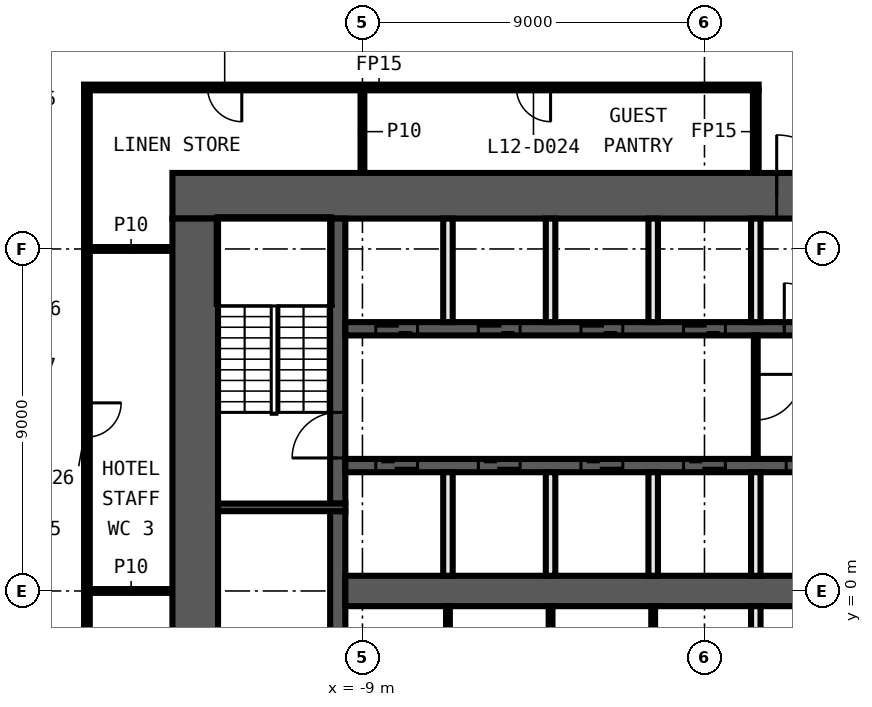
"""IFC4 building model, lengths in metres.
Left out: names, types, materials, properties, quantities, classifications, styles, units other than length and angle.
Written with IfcOpenShell. Run it as: python <this file> out.ifc"""

import sys

from ifc_helpers import new_model, si_unit, direction, frame, frame_2d, origin, place, context, subcontext, project, spatial, rectangle, extrude, element, fill, save


model = new_model("IFC4")
c1 = context("Model", 3, precision=1e-05, world=origin(), true_north=direction((0.0, 1.0)))
c2 = subcontext(c1, "Body", "Model", "MODEL_VIEW")
j1 = project(units=[si_unit("LENGTHUNIT", "METRE"), si_unit("PLANEANGLEUNIT", "RADIAN")], contexts=[c1])
p1 = place(None, origin())
s1 = spatial("IfcSite", under=j1, at=p1, CompositionType="ELEMENT")
p2 = place(p1, origin())
s2 = spatial("IfcBuilding", under=s1, at=p2, CompositionType="ELEMENT")
p3 = place(p2, frame((0.0, 0.0, 66.2)))
s3 = spatial("IfcBuildingStorey", under=s2, at=p3, CompositionType="ELEMENT", Elevation=66.2)
for number, where, z_axis, x_axis in (
    (1, (-16.175, 0.0, 0.0), (0.0, 0.0, 1.0), (1.0, 0.0, 0.0)),
    (2, (-16.175, 9.0, 0.0), (0.0, 0.0, 1.0), (1.0, 0.0, 0.0)),
):
    element("IfcWall", number, at=place(p3, frame(where, z_axis=z_axis, x_axis=x_axis)), inside=s3, PredefinedType="PARTITIONING", context=c2, shape_type="SweptSolid", body=[
        extrude(rectangle(XDim=2.175, YDim=0.1, at=frame_2d((1.087, 0.0))), origin(), (0.0, 0.0, 1.0), 3.3),
    ])
p4 = place(p3, frame((1.425, 13.25, 0.0), z_axis=(0.0, 0.0, 1.0), x_axis=(-1.0, 0.0, 0.0)))
e3 = element("IfcWall", 3, at=p4, inside=s3, PredefinedType="PARTITIONING", context=c2, shape_type="SweptSolid", body=[
    extrude(rectangle(XDim=17.75, YDim=0.15, at=frame_2d((8.875, 0.0))), origin(), (0.0, 0.0, 1.0), 3.3),
])
p5 = place(p4, frame((5.475, 0.0, 0.0)))
e4 = element("IfcOpeningElement", 4, at=p5, cuts=e3, PredefinedType="OPENING", context=c2, shape_type="SweptSolid", body=[
    extrude(rectangle(XDim=0.9, YDim=2.1, at=frame_2d((0.45, 1.05))), frame((0.0, 0.085, 0.0), z_axis=(0.0, -1.0, 0.0), x_axis=(1.0, 0.0, 0.0)), (0.0, 0.0, 1.0), 0.17),
])
p6 = place(p4, frame((13.6, 0.0, 0.0)))
e5 = element("IfcOpeningElement", 5, at=p6, cuts=e3, PredefinedType="OPENING", context=c2, shape_type="SweptSolid", body=[
    extrude(rectangle(XDim=0.9, YDim=2.1, at=frame_2d((0.45, 1.05))), frame((0.0, 0.085, 0.0), z_axis=(0.0, -1.0, 0.0), x_axis=(1.0, 0.0, 0.0)), (0.0, 0.0, 1.0), 0.17),
])
p7 = place(p3, frame((1.35, 11.0, 0.0), z_axis=(0.0, 0.0, 1.0), x_axis=(0.0, 1.0, 0.0)))
e6 = element("IfcWall", 6, at=p7, inside=s3, PredefinedType="PARTITIONING", context=c2, shape_type="SweptSolid", body=[
    extrude(rectangle(XDim=2.175, YDim=0.15, at=frame_2d((1.087, 0.0))), origin(), (0.0, 0.0, 1.0), 3.3),
])
p8 = place(p3, frame((-9.0, 11.0, 0.0), z_axis=(0.0, 0.0, 1.0), x_axis=(0.0, 1.0, 0.0)))
e7 = element("IfcWall", 7, at=p8, inside=s3, PredefinedType="PARTITIONING", context=c2, shape_type="SweptSolid", body=[
    extrude(rectangle(XDim=2.175, YDim=0.1, at=frame_2d((1.087, 0.0))), origin(), (0.0, 0.0, 1.0), 3.3),
])
p9 = place(p3, frame((-16.25, 13.175, 0.0), z_axis=(0.0, 0.0, 1.0), x_axis=(0.0, -1.0, 0.0)))
e8 = element("IfcWall", 8, at=p9, inside=s3, PredefinedType="PARTITIONING", context=c2, shape_type="SweptSolid", body=[
    extrude(rectangle(XDim=26.35, YDim=0.15, at=frame_2d((13.175, 0.0))), origin(), (0.0, 0.0, 1.0), 3.3),
])
p10 = place(p9, frame((17.225, 0.0, 0.0)))
e9 = element("IfcOpeningElement", 9, at=p10, cuts=e8, PredefinedType="OPENING", context=c2, shape_type="SweptSolid", body=[
    extrude(rectangle(XDim=0.9, YDim=2.1, at=frame_2d((0.45, 1.05))), frame((0.0, 0.085, 0.0), z_axis=(0.0, -1.0, 0.0), x_axis=(1.0, 0.0, 0.0)), (0.0, 0.0, 1.0), 0.17),
])
p11 = place(p9, frame((8.225, 0.0, 0.0)))
e10 = element("IfcOpeningElement", 10, at=p11, cuts=e8, PredefinedType="OPENING", context=c2, shape_type="SweptSolid", body=[
    extrude(rectangle(XDim=0.9, YDim=2.1, at=frame_2d((0.45, 1.05))), frame((0.0, 0.085, 0.0), z_axis=(0.0, -1.0, 0.0), x_axis=(1.0, 0.0, 0.0)), (0.0, 0.0, 1.0), 0.17),
])
p12 = place(p3, frame((-14.0, 10.4, 0.0), z_axis=(0.0, 0.0, 1.0), x_axis=(1.0, 0.0, 0.0)))
e11 = element("IfcWall", 11, at=p12, inside=s3, PredefinedType="SHEAR", context=c2, shape_type="SweptSolid", body=[
    extrude(rectangle(XDim=28.0, YDim=1.2, at=frame_2d((14.0, 0.0))), origin(), (0.0, 0.0, 1.0), 3.3),
])
p13 = place(p12, frame((15.9, 0.0, 0.0)))
e12 = element("IfcOpeningElement", 12, at=p13, cuts=e11, PredefinedType="OPENING", context=c2, shape_type="SweptSolid", body=[
    extrude(rectangle(XDim=1.6, YDim=2.1, at=frame_2d((0.8, 1.05))), frame((0.0, 0.61, 0.0), z_axis=(0.0, -1.0, 0.0), x_axis=(1.0, 0.0, 0.0)), (0.0, 0.0, 1.0), 1.22),
])
p14 = place(p3, frame((-13.4, -9.8, 0.0), z_axis=(0.0, 0.0, 1.0), x_axis=(0.0, 1.0, 0.0)))
e13 = element("IfcWall", 13, at=p14, inside=s3, PredefinedType="SHEAR", context=c2, shape_type="SweptSolid", body=[
    extrude(rectangle(XDim=19.6, YDim=1.2, at=frame_2d((9.8, 0.0))), origin(), (0.0, 0.0, 1.0), 3.3),
])
p15 = place(p3, frame((-9.65, -2.1, 0.0), z_axis=(0.0, 0.0, 1.0), x_axis=(0.0, 1.0, 0.0)))
e14 = element("IfcWall", 14, at=p15, inside=s3, PredefinedType="SHEAR", context=c2, shape_type="SweptSolid", body=[
    extrude(rectangle(XDim=4.2, YDim=0.4, at=frame_2d((2.1, 0.0))), origin(), (0.0, 0.0, 1.0), 3.3),
])
p16 = place(p3, frame((-9.65, 2.3, 0.0), z_axis=(0.0, 0.0, 1.0), x_axis=(0.0, 1.0, 0.0)))
e15 = element("IfcWall", 15, at=p16, inside=s3, PredefinedType="SHEAR", context=c2, shape_type="SweptSolid", body=[
    extrude(rectangle(XDim=7.5, YDim=0.4, at=frame_2d((3.75, 0.0))), origin(), (0.0, 0.0, 1.0), 3.3),
])
p17 = place(p16, frame((1.2, 0.0, 0.0)))
e16 = element("IfcOpeningElement", 16, at=p17, cuts=e15, PredefinedType="OPENING", context=c2, shape_type="SweptSolid", body=[
    extrude(rectangle(XDim=1.2, YDim=2.1, at=frame_2d((0.6, 1.05))), frame((0.0, 0.21, 0.0), z_axis=(0.0, -1.0, 0.0), x_axis=(1.0, 0.0, 0.0)), (0.0, 0.0, 1.0), 0.42),
])
p18 = place(p3, frame((-9.45, 2.2, 0.0), z_axis=(0.0, 0.0, 1.0), x_axis=(-1.0, 0.0, 0.0)))
e17 = element("IfcWall", 17, at=p18, inside=s3, PredefinedType="SHEAR", context=c2, shape_type="SweptSolid", body=[
    extrude(rectangle(XDim=3.35, YDim=0.2, at=frame_2d((1.675, 0.0))), origin(), (0.0, 0.0, 1.0), 3.3),
])
p19 = place(p3, frame((-9.45, 6.9, 0.0), z_axis=(0.0, 0.0, 1.0), x_axis=(1.0, 0.0, 0.0)))
e18 = element("IfcWall", 18, at=p19, inside=s3, PredefinedType="SHEAR", context=c2, shape_type="SweptSolid", body=[
    extrude(rectangle(XDim=18.9, YDim=0.35, at=frame_2d((9.45, 0.0))), origin(), (0.0, 0.0, 1.0), 3.3),
])
p20 = place(p19, frame((0.8, 0.0, 0.0)))
e19 = element("IfcOpeningElement", 19, at=p20, cuts=e18, PredefinedType="OPENING", context=c2, shape_type="SweptSolid", body=[
    extrude(rectangle(XDim=1.1, YDim=2.1, at=frame_2d((0.55, 1.05))), frame((0.0, 0.185, 0.0), z_axis=(0.0, -1.0, 0.0), x_axis=(1.0, 0.0, 0.0)), (0.0, 0.0, 1.0), 0.37),
])
p21 = place(p19, frame((3.5, 0.0, 0.0)))
e20 = element("IfcOpeningElement", 20, at=p21, cuts=e18, PredefinedType="OPENING", context=c2, shape_type="SweptSolid", body=[
    extrude(rectangle(XDim=1.1, YDim=2.1, at=frame_2d((0.55, 1.05))), frame((0.0, 0.185, 0.0), z_axis=(0.0, -1.0, 0.0), x_axis=(1.0, 0.0, 0.0)), (0.0, 0.0, 1.0), 0.37),
])
p22 = place(p19, frame((6.2, 0.0, 0.0)))
e21 = element("IfcOpeningElement", 21, at=p22, cuts=e18, PredefinedType="OPENING", context=c2, shape_type="SweptSolid", body=[
    extrude(rectangle(XDim=1.1, YDim=2.1, at=frame_2d((0.55, 1.05))), frame((0.0, 0.185, 0.0), z_axis=(0.0, -1.0, 0.0), x_axis=(1.0, 0.0, 0.0)), (0.0, 0.0, 1.0), 0.37),
])
p23 = place(p19, frame((8.9, 0.0, 0.0)))
e22 = element("IfcOpeningElement", 22, at=p23, cuts=e18, PredefinedType="OPENING", context=c2, shape_type="SweptSolid", body=[
    extrude(rectangle(XDim=1.1, YDim=2.1, at=frame_2d((0.55, 1.05))), frame((0.0, 0.185, 0.0), z_axis=(0.0, -1.0, 0.0), x_axis=(1.0, 0.0, 0.0)), (0.0, 0.0, 1.0), 0.37),
])
p24 = place(p19, frame((11.55, 0.0, 0.0)))
e23 = element("IfcOpeningElement", 23, at=p24, cuts=e18, PredefinedType="OPENING", context=c2, shape_type="SweptSolid", body=[
    extrude(rectangle(XDim=1.2, YDim=2.1, at=frame_2d((0.6, 1.05))), frame((0.0, 0.185, 0.0), z_axis=(0.0, -1.0, 0.0), x_axis=(1.0, 0.0, 0.0)), (0.0, 0.0, 1.0), 0.37),
])
p25 = place(p19, frame((14.3, 0.0, 0.0)))
e24 = element("IfcOpeningElement", 24, at=p25, cuts=e18, PredefinedType="OPENING", context=c2, shape_type="SweptSolid", body=[
    extrude(rectangle(XDim=1.1, YDim=2.1, at=frame_2d((0.55, 1.05))), frame((0.0, 0.185, 0.0), z_axis=(0.0, -1.0, 0.0), x_axis=(1.0, 0.0, 0.0)), (0.0, 0.0, 1.0), 0.37),
])
p26 = place(p19, frame((17.0, 0.0, 0.0)))
e25 = element("IfcOpeningElement", 25, at=p26, cuts=e18, PredefinedType="OPENING", context=c2, shape_type="SweptSolid", body=[
    extrude(rectangle(XDim=1.1, YDim=2.1, at=frame_2d((0.55, 1.05))), frame((0.0, 0.185, 0.0), z_axis=(0.0, -1.0, 0.0), x_axis=(1.0, 0.0, 0.0)), (0.0, 0.0, 1.0), 0.37),
])
p27 = place(p3, frame((9.45, 3.3, 0.0), z_axis=(0.0, 0.0, 1.0), x_axis=(-1.0, 0.0, 0.0)))
e26 = element("IfcWall", 26, at=p27, inside=s3, PredefinedType="SHEAR", context=c2, shape_type="SweptSolid", body=[
    extrude(rectangle(XDim=18.9, YDim=0.35, at=frame_2d((9.45, 0.0))), origin(), (0.0, 0.0, 1.0), 3.3),
])
p28 = place(p27, frame((17.0, 0.0, 0.0)))
e27 = element("IfcOpeningElement", 27, at=p28, cuts=e26, PredefinedType="OPENING", context=c2, shape_type="SweptSolid", body=[
    extrude(rectangle(XDim=1.1, YDim=2.1, at=frame_2d((0.55, 1.05))), frame((0.0, 0.185, 0.0), z_axis=(0.0, -1.0, 0.0), x_axis=(1.0, 0.0, 0.0)), (0.0, 0.0, 1.0), 0.37),
])
p29 = place(p27, frame((14.3, 0.0, 0.0)))
e28 = element("IfcOpeningElement", 28, at=p29, cuts=e26, PredefinedType="OPENING", context=c2, shape_type="SweptSolid", body=[
    extrude(rectangle(XDim=1.1, YDim=2.1, at=frame_2d((0.55, 1.05))), frame((0.0, 0.185, 0.0), z_axis=(0.0, -1.0, 0.0), x_axis=(1.0, 0.0, 0.0)), (0.0, 0.0, 1.0), 0.37),
])
p30 = place(p27, frame((11.6, 0.0, 0.0)))
e29 = element("IfcOpeningElement", 29, at=p30, cuts=e26, PredefinedType="OPENING", context=c2, shape_type="SweptSolid", body=[
    extrude(rectangle(XDim=1.1, YDim=2.1, at=frame_2d((0.55, 1.05))), frame((0.0, 0.185, 0.0), z_axis=(0.0, -1.0, 0.0), x_axis=(1.0, 0.0, 0.0)), (0.0, 0.0, 1.0), 0.37),
])
p31 = place(p27, frame((8.9, 0.0, 0.0)))
e30 = element("IfcOpeningElement", 30, at=p31, cuts=e26, PredefinedType="OPENING", context=c2, shape_type="SweptSolid", body=[
    extrude(rectangle(XDim=1.1, YDim=2.1, at=frame_2d((0.55, 1.05))), frame((0.0, 0.185, 0.0), z_axis=(0.0, -1.0, 0.0), x_axis=(1.0, 0.0, 0.0)), (0.0, 0.0, 1.0), 0.37),
])
p32 = place(p27, frame((6.2, 0.0, 0.0)))
e31 = element("IfcOpeningElement", 31, at=p32, cuts=e26, PredefinedType="OPENING", context=c2, shape_type="SweptSolid", body=[
    extrude(rectangle(XDim=1.1, YDim=2.1, at=frame_2d((0.55, 1.05))), frame((0.0, 0.185, 0.0), z_axis=(0.0, -1.0, 0.0), x_axis=(1.0, 0.0, 0.0)), (0.0, 0.0, 1.0), 0.37),
])
p33 = place(p27, frame((3.5, 0.0, 0.0)))
e32 = element("IfcOpeningElement", 32, at=p33, cuts=e26, PredefinedType="OPENING", context=c2, shape_type="SweptSolid", body=[
    extrude(rectangle(XDim=1.1, YDim=2.1, at=frame_2d((0.55, 1.05))), frame((0.0, 0.185, 0.0), z_axis=(0.0, -1.0, 0.0), x_axis=(1.0, 0.0, 0.0)), (0.0, 0.0, 1.0), 0.37),
])
p34 = place(p27, frame((0.9, 0.0, 0.0)))
e33 = element("IfcOpeningElement", 33, at=p34, cuts=e26, PredefinedType="OPENING", context=c2, shape_type="SweptSolid", body=[
    extrude(rectangle(XDim=0.9, YDim=2.1, at=frame_2d((0.45, 1.05))), frame((0.0, 0.185, 0.0), z_axis=(0.0, -1.0, 0.0), x_axis=(1.0, 0.0, 0.0)), (0.0, 0.0, 1.0), 0.37),
])
p35 = place(p3, frame((-9.45, 0.0, 0.0), z_axis=(0.0, 0.0, 1.0), x_axis=(1.0, 0.0, 0.0)))
e34 = element("IfcWall", 34, at=p35, inside=s3, PredefinedType="SHEAR", context=c2, shape_type="SweptSolid", body=[
    extrude(rectangle(XDim=18.9, YDim=0.8, at=frame_2d((9.45, 0.0))), origin(), (0.0, 0.0, 1.0), 3.3),
])
p36 = place(p3, frame((1.35, 6.725, 0.0), z_axis=(0.0, 0.0, 1.0), x_axis=(0.0, -1.0, 0.0)))
e35 = element("IfcWall", 35, at=p36, inside=s3, PredefinedType="PARTITIONING", context=c2, shape_type="SweptSolid", body=[
    extrude(rectangle(XDim=3.25, YDim=0.1, at=frame_2d((1.625, 0.0))), origin(), (0.0, 0.0, 1.0), 3.3),
])
p37 = place(p36, frame((1.025, 0.0, 0.0)))
e36 = element("IfcOpeningElement", 36, at=p37, cuts=e35, PredefinedType="OPENING", context=c2, shape_type="SweptSolid", body=[
    extrude(rectangle(XDim=1.2, YDim=2.1, at=frame_2d((0.6, 1.05))), frame((0.0, 0.06, 0.0), z_axis=(0.0, -1.0, 0.0), x_axis=(1.0, 0.0, 0.0)), (0.0, 0.0, 1.0), 0.12),
])
for number, where, z_axis, x_axis in (
    (37, (1.35, -3.125, 0.0), (0.0, 0.0, 1.0), (0.0, 1.0, 0.0)),
    (38, (1.35, 0.4, 0.0), (0.0, 0.0, 1.0), (0.0, 1.0, 0.0)),
    (39, (1.35, 7.075, 0.0), (0.0, 0.0, 1.0), (0.0, 1.0, 0.0)),
):
    element("IfcWall", number, at=place(p3, frame(where, z_axis=z_axis, x_axis=x_axis)), inside=s3, PredefinedType="SOLIDWALL", context=c2, shape_type="SweptSolid", body=[
        extrude(rectangle(XDim=2.725, YDim=0.25, at=frame_2d((1.363, 0.0))), origin(), (0.0, 0.0, 1.0), 3.3),
    ])
p38 = place(p3, frame((-1.35, -3.125, 0.0), z_axis=(0.0, 0.0, 1.0), x_axis=(0.0, 1.0, 0.0)))
e40 = element("IfcWall", 40, at=p38, inside=s3, PredefinedType="PARTITIONING", context=c2, shape_type="SweptSolid", body=[
    extrude(rectangle(XDim=2.725, YDim=0.1, at=frame_2d((1.363, 0.0))), origin(), (0.0, 0.0, 1.0), 3.3),
])
for number, where, z_axis, x_axis in (
    (41, (-1.35, 0.4, 0.0), (0.0, 0.0, 1.0), (0.0, 1.0, 0.0)),
    (42, (-1.35, 7.075, 0.0), (0.0, 0.0, 1.0), (0.0, 1.0, 0.0)),
):
    element("IfcWall", number, at=place(p3, frame(where, z_axis=z_axis, x_axis=x_axis)), inside=s3, PredefinedType="SOLIDWALL", context=c2, shape_type="SweptSolid", body=[
        extrude(rectangle(XDim=2.725, YDim=0.25, at=frame_2d((1.363, 0.0))), origin(), (0.0, 0.0, 1.0), 3.3),
    ])
p39 = place(p3, frame((-4.05, -3.125, 0.0), z_axis=(0.0, 0.0, 1.0), x_axis=(0.0, 1.0, 0.0)))
e43 = element("IfcWall", 43, at=p39, inside=s3, PredefinedType="PARTITIONING", context=c2, shape_type="SweptSolid", body=[
    extrude(rectangle(XDim=2.725, YDim=0.1, at=frame_2d((1.363, 0.0))), origin(), (0.0, 0.0, 1.0), 3.3),
])
for number, where, z_axis, x_axis in (
    (44, (-4.05, 0.4, 0.0), (0.0, 0.0, 1.0), (0.0, 1.0, 0.0)),
    (45, (-4.05, 7.075, 0.0), (0.0, 0.0, 1.0), (0.0, 1.0, 0.0)),
):
    element("IfcWall", number, at=place(p3, frame(where, z_axis=z_axis, x_axis=x_axis)), inside=s3, PredefinedType="SOLIDWALL", context=c2, shape_type="SweptSolid", body=[
        extrude(rectangle(XDim=2.725, YDim=0.25, at=frame_2d((1.363, 0.0))), origin(), (0.0, 0.0, 1.0), 3.3),
    ])
p40 = place(p3, frame((-6.75, -3.125, 0.0), z_axis=(0.0, 0.0, 1.0), x_axis=(0.0, 1.0, 0.0)))
e46 = element("IfcWall", 46, at=p40, inside=s3, PredefinedType="PARTITIONING", context=c2, shape_type="SweptSolid", body=[
    extrude(rectangle(XDim=2.725, YDim=0.1, at=frame_2d((1.363, 0.0))), origin(), (0.0, 0.0, 1.0), 3.3),
])
for number, where, z_axis, x_axis in (
    (47, (-6.75, 0.4, 0.0), (0.0, 0.0, 1.0), (0.0, 1.0, 0.0)),
    (48, (-6.75, 7.075, 0.0), (0.0, 0.0, 1.0), (0.0, 1.0, 0.0)),
):
    element("IfcWall", number, at=place(p3, frame(where, z_axis=z_axis, x_axis=x_axis)), inside=s3, PredefinedType="SOLIDWALL", context=c2, shape_type="SweptSolid", body=[
        extrude(rectangle(XDim=2.725, YDim=0.25, at=frame_2d((1.363, 0.0))), origin(), (0.0, 0.0, 1.0), 3.3),
    ])
p41 = place(p5, origin())
e49 = element("IfcDoor", 49, at=p41, inside=s3, OperationType="SINGLE_SWING_RIGHT", PredefinedType="DOOR", context=c2, shape_type="SweptSolid", body=[
    extrude(rectangle(XDim=0.9, YDim=2.1, at=frame_2d((0.45, 1.05))), frame((0.0, 0.025, 0.0), z_axis=(0.0, -1.0, 0.0), x_axis=(1.0, 0.0, 0.0)), (0.0, 0.0, 1.0), 0.05),
])
fill(e4, e49)
p42 = place(p6, origin())
e50 = element("IfcDoor", 50, at=p42, inside=s3, OperationType="SINGLE_SWING_LEFT", PredefinedType="DOOR", context=c2, shape_type="SweptSolid", body=[
    extrude(rectangle(XDim=0.9, YDim=2.1, at=frame_2d((0.45, 1.05))), frame((0.0, 0.025, 0.0), z_axis=(0.0, -1.0, 0.0), x_axis=(1.0, 0.0, 0.0)), (0.0, 0.0, 1.0), 0.05),
])
fill(e5, e50)
p43 = place(p11, origin())
e51 = element("IfcDoor", 51, at=p43, inside=s3, OperationType="SINGLE_SWING_RIGHT", PredefinedType="DOOR", context=c2, shape_type="SweptSolid", body=[
    extrude(rectangle(XDim=0.9, YDim=2.1, at=frame_2d((0.45, 1.05))), frame((0.0, 0.025, 0.0), z_axis=(0.0, -1.0, 0.0), x_axis=(1.0, 0.0, 0.0)), (0.0, 0.0, 1.0), 0.05),
])
fill(e10, e51)
p44 = place(p20, origin())
e52 = element("IfcDoor", 52, at=p44, inside=s3, OperationType="DOUBLE_DOOR_SLIDING", PredefinedType="DOOR", context=c2, shape_type="SweptSolid", body=[
    extrude(rectangle(XDim=1.1, YDim=2.1, at=frame_2d((0.55, 1.05))), frame((0.0, 0.025, 0.0), z_axis=(0.0, -1.0, 0.0), x_axis=(1.0, 0.0, 0.0)), (0.0, 0.0, 1.0), 0.05),
])
fill(e19, e52)
p45 = place(p21, origin())
e53 = element("IfcDoor", 53, at=p45, inside=s3, OperationType="DOUBLE_DOOR_SLIDING", PredefinedType="DOOR", context=c2, shape_type="SweptSolid", body=[
    extrude(rectangle(XDim=1.1, YDim=2.1, at=frame_2d((0.55, 1.05))), frame((0.0, 0.025, 0.0), z_axis=(0.0, -1.0, 0.0), x_axis=(1.0, 0.0, 0.0)), (0.0, 0.0, 1.0), 0.05),
])
fill(e20, e53)
p46 = place(p22, origin())
e54 = element("IfcDoor", 54, at=p46, inside=s3, OperationType="DOUBLE_DOOR_SLIDING", PredefinedType="DOOR", context=c2, shape_type="SweptSolid", body=[
    extrude(rectangle(XDim=1.1, YDim=2.1, at=frame_2d((0.55, 1.05))), frame((0.0, 0.025, 0.0), z_axis=(0.0, -1.0, 0.0), x_axis=(1.0, 0.0, 0.0)), (0.0, 0.0, 1.0), 0.05),
])
fill(e21, e54)
p47 = place(p23, origin())
e55 = element("IfcDoor", 55, at=p47, inside=s3, OperationType="DOUBLE_DOOR_SLIDING", PredefinedType="DOOR", context=c2, shape_type="SweptSolid", body=[
    extrude(rectangle(XDim=1.1, YDim=2.1, at=frame_2d((0.55, 1.05))), frame((0.0, 0.025, 0.0), z_axis=(0.0, -1.0, 0.0), x_axis=(1.0, 0.0, 0.0)), (0.0, 0.0, 1.0), 0.05),
])
fill(e22, e55)
p48 = place(p13, origin())
e56 = element("IfcDoor", 56, at=p48, inside=s3, OperationType="DOUBLE_DOOR_SINGLE_SWING", PredefinedType="DOOR", context=c2, shape_type="SweptSolid", body=[
    extrude(rectangle(XDim=1.6, YDim=2.1, at=frame_2d((0.8, 1.05))), frame((0.0, 0.025, 0.0), z_axis=(0.0, -1.0, 0.0), x_axis=(1.0, 0.0, 0.0)), (0.0, 0.0, 1.0), 0.05),
])
fill(e12, e56)
p49 = place(p24, origin())
e57 = element("IfcDoor", 57, at=p49, inside=s3, OperationType="SINGLE_SWING_LEFT", PredefinedType="DOOR", context=c2, shape_type="SweptSolid", body=[
    extrude(rectangle(XDim=1.2, YDim=2.1, at=frame_2d((0.6, 1.05))), frame((0.0, 0.025, 0.0), z_axis=(0.0, -1.0, 0.0), x_axis=(1.0, 0.0, 0.0)), (0.0, 0.0, 1.0), 0.05),
])
fill(e23, e57)
p50 = place(p28, origin())
e58 = element("IfcDoor", 58, at=p50, inside=s3, OperationType="DOUBLE_DOOR_SLIDING", PredefinedType="DOOR", context=c2, shape_type="SweptSolid", body=[
    extrude(rectangle(XDim=1.1, YDim=2.1, at=frame_2d((0.55, 1.05))), frame((0.0, 0.025, 0.0), z_axis=(0.0, -1.0, 0.0), x_axis=(1.0, 0.0, 0.0)), (0.0, 0.0, 1.0), 0.05),
])
fill(e27, e58)
p51 = place(p29, origin())
e59 = element("IfcDoor", 59, at=p51, inside=s3, OperationType="DOUBLE_DOOR_SLIDING", PredefinedType="DOOR", context=c2, shape_type="SweptSolid", body=[
    extrude(rectangle(XDim=1.1, YDim=2.1, at=frame_2d((0.55, 1.05))), frame((0.0, 0.025, 0.0), z_axis=(0.0, -1.0, 0.0), x_axis=(1.0, 0.0, 0.0)), (0.0, 0.0, 1.0), 0.05),
])
fill(e28, e59)
p52 = place(p30, origin())
e60 = element("IfcDoor", 60, at=p52, inside=s3, OperationType="DOUBLE_DOOR_SLIDING", PredefinedType="DOOR", context=c2, shape_type="SweptSolid", body=[
    extrude(rectangle(XDim=1.1, YDim=2.1, at=frame_2d((0.55, 1.05))), frame((0.0, 0.025, 0.0), z_axis=(0.0, -1.0, 0.0), x_axis=(1.0, 0.0, 0.0)), (0.0, 0.0, 1.0), 0.05),
])
fill(e29, e60)
p53 = place(p31, origin())
e61 = element("IfcDoor", 61, at=p53, inside=s3, OperationType="DOUBLE_DOOR_SLIDING", PredefinedType="DOOR", context=c2, shape_type="SweptSolid", body=[
    extrude(rectangle(XDim=1.1, YDim=2.1, at=frame_2d((0.55, 1.05))), frame((0.0, 0.025, 0.0), z_axis=(0.0, -1.0, 0.0), x_axis=(1.0, 0.0, 0.0)), (0.0, 0.0, 1.0), 0.05),
])
fill(e30, e61)
p54 = place(p32, origin())
e62 = element("IfcDoor", 62, at=p54, inside=s3, OperationType="DOUBLE_DOOR_SLIDING", PredefinedType="DOOR", context=c2, shape_type="SweptSolid", body=[
    extrude(rectangle(XDim=1.1, YDim=2.1, at=frame_2d((0.55, 1.05))), frame((0.0, 0.025, 0.0), z_axis=(0.0, -1.0, 0.0), x_axis=(1.0, 0.0, 0.0)), (0.0, 0.0, 1.0), 0.05),
])
fill(e31, e62)
p55 = place(p17, origin())
e63 = element("IfcDoor", 63, at=p55, inside=s3, OperationType="SINGLE_SWING_RIGHT", PredefinedType="DOOR", context=c2, shape_type="SweptSolid", body=[
    extrude(rectangle(XDim=1.2, YDim=2.1, at=frame_2d((0.6, 1.05))), frame((0.0, 0.025, 0.0), z_axis=(0.0, -1.0, 0.0), x_axis=(1.0, 0.0, 0.0)), (0.0, 0.0, 1.0), 0.05),
])
fill(e16, e63)
p56 = place(p37, origin())
e64 = element("IfcDoor", 64, at=p56, inside=s3, OperationType="SINGLE_SWING_LEFT", PredefinedType="DOOR", context=c2, shape_type="SweptSolid", body=[
    extrude(rectangle(XDim=1.2, YDim=2.1, at=frame_2d((0.6, 1.05))), frame((0.0, 0.025, 0.0), z_axis=(0.0, -1.0, 0.0), x_axis=(1.0, 0.0, 0.0)), (0.0, 0.0, 1.0), 0.05),
])
fill(e36, e64)
save(model, sys.argv[1])
